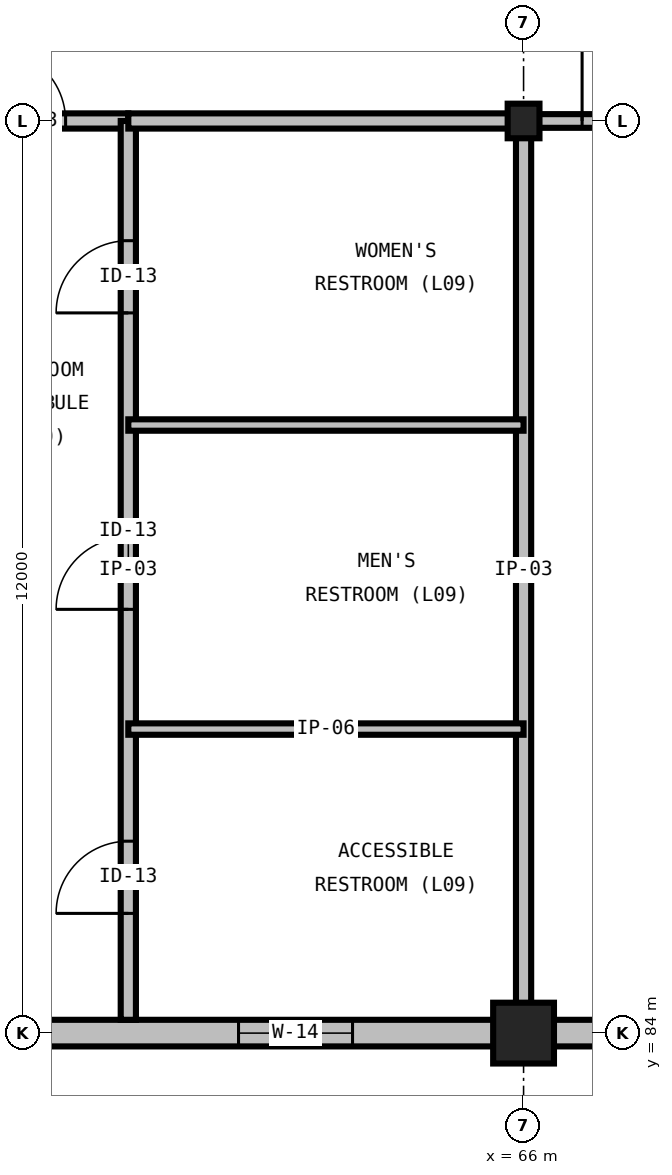
"""IFC4 building model, lengths in metres.
Left out: names, types, materials, properties, quantities, classifications, styles, units other than length and angle.
Written with IfcOpenShell. Run it as: python <this file> out.ifc"""

import sys

from ifc_helpers import new_model, si_unit, direction, frame, frame_2d, origin, origin_2d, place, context, subcontext, project, spatial, rectangle, i_section, extrude, element, fill, save


model = new_model("IFC4")
c1 = context("Model", 3, precision=1e-05, world=origin(), true_north=direction((0.0, 1.0)))
c2 = subcontext(c1, "Body", "Model", "MODEL_VIEW")
j1 = project(units=[si_unit("LENGTHUNIT", "METRE"), si_unit("PLANEANGLEUNIT", "RADIAN")], contexts=[c1])
p1 = place(None, origin())
s1 = spatial("IfcSite", under=j1, at=p1, CompositionType="ELEMENT")
p2 = place(p1, origin())
s2 = spatial("IfcBuilding", under=s1, at=p2, CompositionType="ELEMENT")
p3 = place(p2, frame((0.0, 0.0, 42.0)))
s3 = spatial("IfcBuildingStorey", under=s2, at=p3, CompositionType="ELEMENT", Elevation=42.0)
p4 = place(p3, frame((66.0, 84.0, 0.0), z_axis=(0.0, 0.0, 1.0), x_axis=(1.0, 0.0, 0.0)))
e1 = element("IfcColumn", 1, at=p4, inside=s3, PredefinedType="COLUMN", context=c2, shape_type="SweptSolid", body=[
    extrude(rectangle(XDim=0.8, YDim=0.8, at=origin_2d()), origin(), (0.0, 0.0, 1.0), 3.6),
])
p5 = place(p3, frame((66.0, 96.0, 0.0), z_axis=(0.0, 0.0, 1.0), x_axis=(1.0, 0.0, 0.0)))
e2 = element("IfcColumn", 2, at=p5, inside=s3, PredefinedType="COLUMN", context=c2, shape_type="SweptSolid", body=[
    extrude(i_section(OverallWidth=0.419, OverallDepth=0.455, WebThickness=0.042, FlangeThickness=0.068, FilletRadius=0.031, at=origin_2d()), origin(), (0.0, 0.0, 1.0), 3.6),
])
p6 = place(p3, frame((54.0, 84.0, 0.0), z_axis=(0.0, 0.0, 1.0), x_axis=(1.0, 0.0, 0.0)))
e3 = element("IfcWall", 3, at=p6, inside=s3, PredefinedType="STANDARD", context=c2, shape_type="SweptSolid", body=[
    extrude(rectangle(XDim=12.0, YDim=0.35, at=frame_2d((6.0, 0.0))), origin(), (0.0, 0.0, 1.0), 2.486),
])
p7 = place(p6, frame((2.3, 0.0, 1.0)))
e4 = element("IfcOpeningElement", 4, at=p7, cuts=e3, PredefinedType="OPENING", context=c2, shape_type="SweptSolid", body=[
    extrude(rectangle(XDim=1.4, YDim=1.4, at=frame_2d((0.7, 0.7))), frame((0.0, 0.19, 0.0), z_axis=(0.0, -1.0, 0.0), x_axis=(1.0, 0.0, 0.0)), (0.0, 0.0, 1.0), 0.38),
])
p8 = place(p6, frame((8.25, 0.0, 1.0)))
e5 = element("IfcOpeningElement", 5, at=p8, cuts=e3, PredefinedType="OPENING", context=c2, shape_type="SweptSolid", body=[
    extrude(rectangle(XDim=1.5, YDim=1.35, at=frame_2d((0.75, 0.675))), frame((0.0, 0.19, 0.0), z_axis=(0.0, -1.0, 0.0), x_axis=(1.0, 0.0, 0.0)), (0.0, 0.0, 1.0), 0.38),
])
p9 = place(p3, frame((66.0, 84.0, 0.0), z_axis=(0.0, 0.0, 1.0), x_axis=(1.0, 0.0, 0.0)))
e6 = element("IfcWall", 6, at=p9, inside=s3, PredefinedType="STANDARD", context=c2, shape_type="SweptSolid", body=[
    extrude(rectangle(XDim=12.0, YDim=0.35, at=frame_2d((6.0, 0.0))), origin(), (0.0, 0.0, 1.0), 2.486),
])
p10 = place(p9, frame((1.65, 0.0, 0.72)))
e7 = element("IfcOpeningElement", 7, at=p10, cuts=e6, PredefinedType="OPENING", context=c2, shape_type="SweptSolid", body=[
    extrude(rectangle(XDim=2.7, YDim=1.65, at=frame_2d((1.35, 0.825))), frame((0.0, 0.19, 0.0), z_axis=(0.0, -1.0, 0.0), x_axis=(1.0, 0.0, 0.0)), (0.0, 0.0, 1.0), 0.38),
])
p11 = place(p9, frame((7.65, 0.0, 0.72)))
e8 = element("IfcOpeningElement", 8, at=p11, cuts=e6, PredefinedType="OPENING", context=c2, shape_type="SweptSolid", body=[
    extrude(rectangle(XDim=2.7, YDim=1.65, at=frame_2d((1.35, 0.825))), frame((0.0, 0.19, 0.0), z_axis=(0.0, -1.0, 0.0), x_axis=(1.0, 0.0, 0.0)), (0.0, 0.0, 1.0), 0.38),
])
p12 = place(p3, frame((58.4, 96.0, 0.0), z_axis=(0.0, 0.0, 1.0), x_axis=(1.0, 0.0, 0.0)))
e9 = element("IfcWall", 9, at=p12, inside=s3, PredefinedType="PARTITIONING", context=c2, shape_type="SweptSolid", body=[
    extrude(rectangle(XDim=2.4, YDim=0.2, at=frame_2d((1.2, 0.0))), origin(), (0.0, 0.0, 1.0), 2.359),
])
p13 = place(p12, frame((0.625, 0.0, 0.0)))
e10 = element("IfcOpeningElement", 10, at=p13, cuts=e9, PredefinedType="OPENING", context=c2, shape_type="SweptSolid", body=[
    extrude(rectangle(XDim=0.95, YDim=2.15, at=frame_2d((0.475, 1.075))), frame((0.0, 0.115, 0.0), z_axis=(0.0, -1.0, 0.0), x_axis=(1.0, 0.0, 0.0)), (0.0, 0.0, 1.0), 0.23),
])
p14 = place(p3, frame((60.8, 84.175, 0.0), z_axis=(0.0, 0.0, 1.0), x_axis=(0.0, 1.0, 0.0)))
e11 = element("IfcWall", 11, at=p14, inside=s3, PredefinedType="PARTITIONING", context=c2, shape_type="SweptSolid", body=[
    extrude(rectangle(XDim=11.825, YDim=0.2, at=frame_2d((5.913, 0.0))), origin(), (0.0, 0.0, 1.0), 3.29),
])
p15 = place(p14, frame((1.4, 0.0, 0.0)))
e12 = element("IfcOpeningElement", 12, at=p15, cuts=e11, PredefinedType="OPENING", context=c2, shape_type="SweptSolid", body=[
    extrude(rectangle(XDim=0.95, YDim=2.15, at=frame_2d((0.475, 1.075))), frame((0.0, 0.115, 0.0), z_axis=(0.0, -1.0, 0.0), x_axis=(1.0, 0.0, 0.0)), (0.0, 0.0, 1.0), 0.23),
])
p16 = place(p14, frame((5.4, 0.0, 0.0)))
e13 = element("IfcOpeningElement", 13, at=p16, cuts=e11, PredefinedType="OPENING", context=c2, shape_type="SweptSolid", body=[
    extrude(rectangle(XDim=0.95, YDim=2.15, at=frame_2d((0.475, 1.075))), frame((0.0, 0.115, 0.0), z_axis=(0.0, -1.0, 0.0), x_axis=(1.0, 0.0, 0.0)), (0.0, 0.0, 1.0), 0.23),
])
p17 = place(p14, frame((9.3, 0.0, 0.0)))
e14 = element("IfcOpeningElement", 14, at=p17, cuts=e11, PredefinedType="OPENING", context=c2, shape_type="SweptSolid", body=[
    extrude(rectangle(XDim=0.95, YDim=2.15, at=frame_2d((0.475, 1.075))), frame((0.0, 0.115, 0.0), z_axis=(0.0, -1.0, 0.0), x_axis=(1.0, 0.0, 0.0)), (0.0, 0.0, 1.0), 0.23),
])
p18 = place(p3, frame((66.0, 84.175, 0.0), z_axis=(0.0, 0.0, 1.0), x_axis=(0.0, 1.0, 0.0)))
e15 = element("IfcWall", 15, at=p18, inside=s3, PredefinedType="PARTITIONING", context=c2, shape_type="SweptSolid", body=[
    extrude(rectangle(XDim=11.825, YDim=0.2, at=frame_2d((5.913, 0.0))), origin(), (0.0, 0.0, 1.0), 2.59),
])
p19 = place(p3, frame((60.8, 96.0, 0.0), z_axis=(0.0, 0.0, 1.0), x_axis=(1.0, 0.0, 0.0)))
e16 = element("IfcWall", 16, at=p19, inside=s3, PredefinedType="PARTITIONING", context=c2, shape_type="SweptSolid", body=[
    extrude(rectangle(XDim=5.2, YDim=0.2, at=frame_2d((2.6, 0.0))), origin(), (0.0, 0.0, 1.0), 2.359),
])
for number, where, z_axis, x_axis in (
    (17, (60.8, 88.0, 0.0), (0.0, 0.0, 1.0), (1.0, 0.0, 0.0)),
    (18, (60.8, 92.0, 0.0), (0.0, 0.0, 1.0), (1.0, 0.0, 0.0)),
):
    element("IfcWall", number, at=place(p3, frame(where, z_axis=z_axis, x_axis=x_axis)), inside=s3, PredefinedType="PARTITIONING", context=c2, shape_type="SweptSolid", body=[
        extrude(rectangle(XDim=5.2, YDim=0.15, at=frame_2d((2.6, 0.0))), origin(), (0.0, 0.0, 1.0), 3.29),
    ])
p20 = place(p3, frame((66.0, 96.0, 0.0), z_axis=(0.0, 0.0, 1.0), x_axis=(1.0, 0.0, 0.0)))
e19 = element("IfcWall", 19, at=p20, inside=s3, PredefinedType="PARTITIONING", context=c2, shape_type="SweptSolid", body=[
    extrude(rectangle(XDim=6.0, YDim=0.18, at=frame_2d((3.0, 0.0))), origin(), (0.0, 0.0, 1.0), 2.664),
])
p21 = place(p20, frame((0.77, 0.0, 0.0)))
e20 = element("IfcOpeningElement", 20, at=p21, cuts=e19, PredefinedType="OPENING", context=c2, shape_type="SweptSolid", body=[
    extrude(rectangle(XDim=1.0, YDim=2.15, at=frame_2d((0.5, 1.075))), frame((0.0, 0.105, 0.0), z_axis=(0.0, -1.0, 0.0), x_axis=(1.0, 0.0, 0.0)), (0.0, 0.0, 1.0), 0.21),
])
p22 = place(p8, origin())
e21 = element("IfcWindow", 21, at=p22, inside=s3, PartitioningType="SINGLE_PANEL", PredefinedType="WINDOW", context=c2, shape_type="SweptSolid", body=[
    extrude(rectangle(XDim=1.5, YDim=1.35, at=frame_2d((0.75, 0.675))), frame((0.0, 0.03, 0.0), z_axis=(0.0, -1.0, 0.0), x_axis=(1.0, 0.0, 0.0)), (0.0, 0.0, 1.0), 0.06),
])
fill(e5, e21)
p23 = place(p13, origin())
e22 = element("IfcDoor", 22, at=p23, inside=s3, OperationType="SINGLE_SWING_LEFT", PredefinedType="DOOR", context=c2, shape_type="SweptSolid", body=[
    extrude(rectangle(XDim=0.95, YDim=2.15, at=frame_2d((0.475, 1.075))), frame((0.0, 0.025, 0.0), z_axis=(0.0, -1.0, 0.0), x_axis=(1.0, 0.0, 0.0)), (0.0, 0.0, 1.0), 0.05),
])
fill(e10, e22)
p24 = place(p15, origin())
e23 = element("IfcDoor", 23, at=p24, inside=s3, OperationType="SINGLE_SWING_LEFT", PredefinedType="DOOR", context=c2, shape_type="SweptSolid", body=[
    extrude(rectangle(XDim=0.95, YDim=2.15, at=frame_2d((0.475, 1.075))), frame((0.0, 0.025, 0.0), z_axis=(0.0, -1.0, 0.0), x_axis=(1.0, 0.0, 0.0)), (0.0, 0.0, 1.0), 0.05),
])
fill(e12, e23)
p25 = place(p16, origin())
e24 = element("IfcDoor", 24, at=p25, inside=s3, OperationType="SINGLE_SWING_LEFT", PredefinedType="DOOR", context=c2, shape_type="SweptSolid", body=[
    extrude(rectangle(XDim=0.95, YDim=2.15, at=frame_2d((0.475, 1.075))), frame((0.0, 0.025, 0.0), z_axis=(0.0, -1.0, 0.0), x_axis=(1.0, 0.0, 0.0)), (0.0, 0.0, 1.0), 0.05),
])
fill(e13, e24)
p26 = place(p17, origin())
e25 = element("IfcDoor", 25, at=p26, inside=s3, OperationType="SINGLE_SWING_LEFT", PredefinedType="DOOR", context=c2, shape_type="SweptSolid", body=[
    extrude(rectangle(XDim=0.95, YDim=2.15, at=frame_2d((0.475, 1.075))), frame((0.0, 0.025, 0.0), z_axis=(0.0, -1.0, 0.0), x_axis=(1.0, 0.0, 0.0)), (0.0, 0.0, 1.0), 0.05),
])
fill(e14, e25)
p27 = place(p21, origin())
e26 = element("IfcDoor", 26, at=p27, inside=s3, OperationType="SINGLE_SWING_LEFT", PredefinedType="DOOR", context=c2, shape_type="SweptSolid", body=[
    extrude(rectangle(XDim=1.0, YDim=2.15, at=frame_2d((0.5, 1.075))), frame((0.0, 0.025, 0.0), z_axis=(0.0, -1.0, 0.0), x_axis=(1.0, 0.0, 0.0)), (0.0, 0.0, 1.0), 0.05),
])
fill(e20, e26)
save(model, sys.argv[1])
